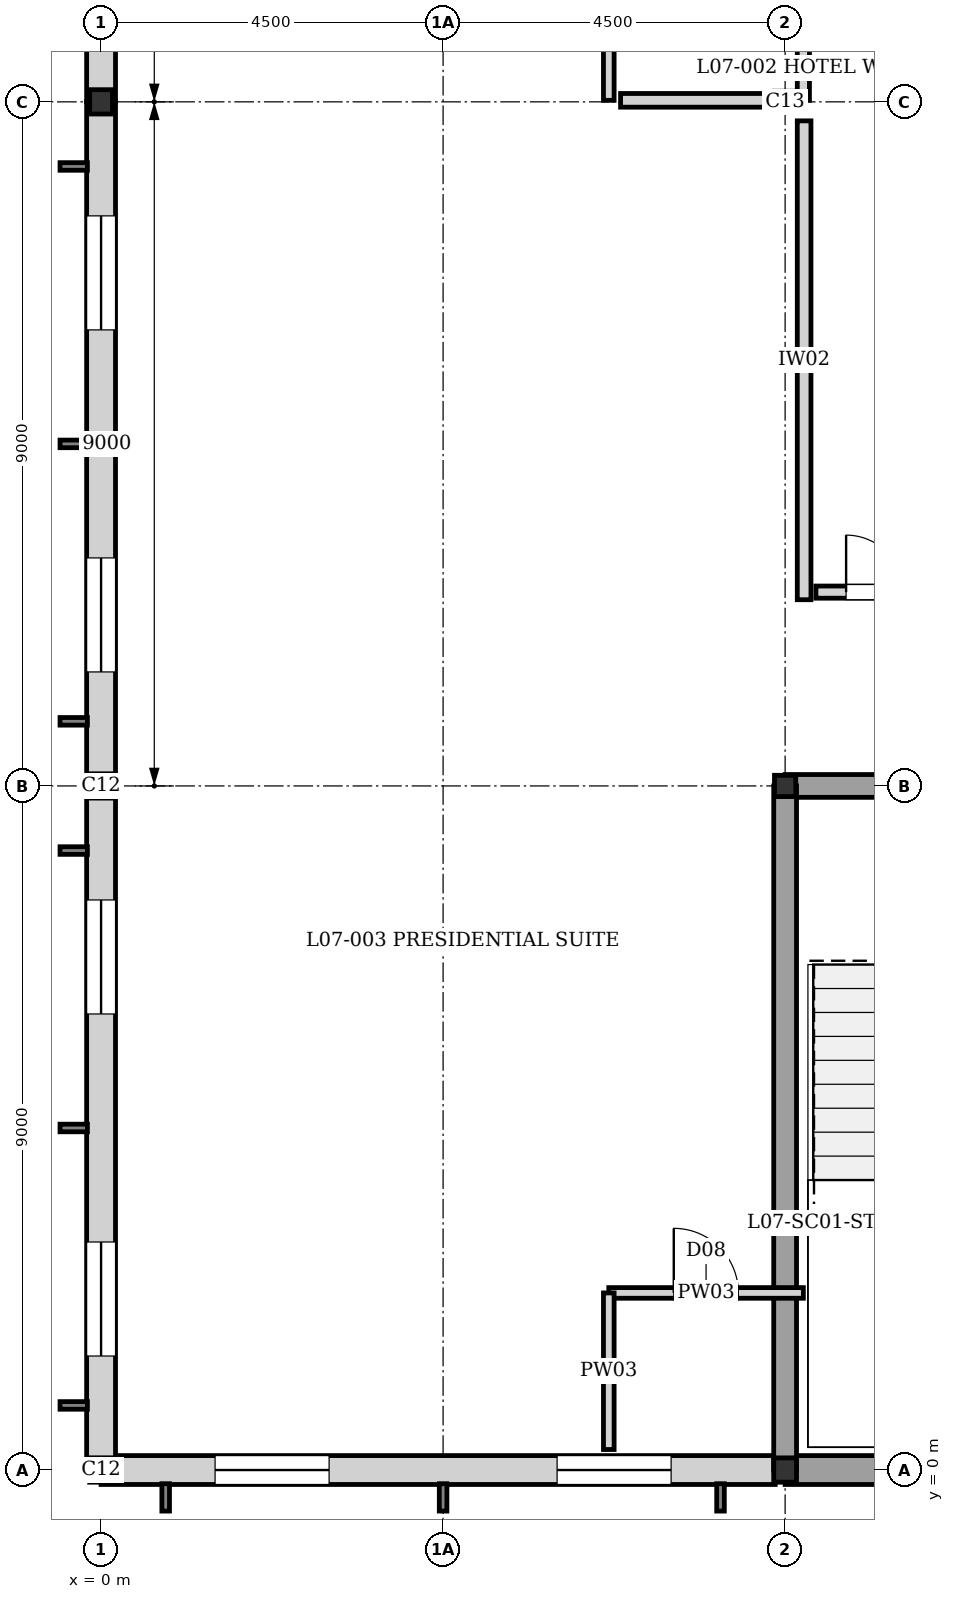
"""IFC4 building model, lengths in metres.
Left out: names, types, materials, properties, quantities, classifications, styles, units other than length and angle.
Written with IfcOpenShell. Run it as: python <this file> out.ifc"""

import sys

from ifc_helpers import new_model, si_unit, direction, frame, frame_2d, origin, origin_2d, place, context, subcontext, project, spatial, rectangle, i_section, extrude, element, fill, save


model = new_model("IFC4")
c1 = context("Model", 3, precision=1e-05, world=origin(), true_north=direction((0.0, 1.0)))
c2 = subcontext(c1, "Body", "Model", "MODEL_VIEW")
j1 = project(units=[si_unit("LENGTHUNIT", "METRE"), si_unit("PLANEANGLEUNIT", "RADIAN")], contexts=[c1])
p1 = place(None, origin())
s1 = spatial("IfcSite", under=j1, at=p1, CompositionType="ELEMENT")
p2 = place(p1, origin())
s2 = spatial("IfcBuilding", under=s1, at=p2, CompositionType="ELEMENT")
p3 = place(p2, frame((0.0, 0.0, 23.68)))
s3 = spatial("IfcBuildingStorey", under=s2, at=p3, CompositionType="ELEMENT", Elevation=23.68)
for number, where, z_axis, x_axis in (
    (1, (0.0, 0.0, 0.0), (0.0, 0.0, 1.0), (1.0, 0.0, 0.0)),
    (2, (0.0, 9.0, 0.0), (0.0, 0.0, 1.0), (1.0, 0.0, 0.0)),
    (3, (0.0, 18.0, 0.0), (0.0, 0.0, 1.0), (1.0, 0.0, 0.0)),
    (4, (9.0, 0.0, 0.0), (0.0, 0.0, 1.0), (1.0, 0.0, 0.0)),
):
    element("IfcColumn", number, at=place(p3, frame(where, z_axis=z_axis, x_axis=x_axis)), inside=s3, PredefinedType="COLUMN", context=c2, shape_type="SweptSolid", body=[
        extrude(i_section(OverallWidth=0.3, OverallDepth=0.32, WebThickness=0.011, FlangeThickness=0.021, at=origin_2d()), origin(), (0.0, 0.0, 1.0), 3.2),
    ])
for number, where, z_axis, x_axis in (
    (5, (9.0, 9.0, 0.0), (0.0, 0.0, 1.0), (1.0, 0.0, 0.0)),
    (6, (9.0, 18.0, 0.0), (0.0, 0.0, 1.0), (1.0, 0.0, 0.0)),
):
    element("IfcColumn", number, at=place(p3, frame(where, z_axis=z_axis, x_axis=x_axis)), inside=s3, PredefinedType="COLUMN", context=c2, shape_type="SweptSolid", body=[
        extrude(i_section(OverallWidth=0.28, OverallDepth=0.28, WebThickness=0.01, FlangeThickness=0.018, at=origin_2d()), origin(), (0.0, 0.0, 1.0), 3.2),
    ])
p4 = place(p3, frame((18.0, 0.0, 0.0), z_axis=(0.0, 0.0, 1.0), x_axis=(-1.0, 0.0, 0.0)))
e7 = element("IfcWall", 7, at=p4, inside=s3, PredefinedType="SOLIDWALL", context=c2, shape_type="SweptSolid", body=[
    extrude(rectangle(XDim=9.0, YDim=0.38, at=frame_2d((4.5, 0.0))), origin(), (0.0, 0.0, 1.0), 2.96),
])
p5 = place(p3, frame((8.87, 0.0, 0.0), z_axis=(0.0, 0.0, 1.0), x_axis=(-1.0, 0.0, 0.0)))
e8 = element("IfcWall", 8, at=p5, inside=s3, PredefinedType="SOLIDWALL", context=c2, shape_type="SweptSolid", body=[
    extrude(rectangle(XDim=8.87, YDim=0.38, at=frame_2d((4.435, 0.0))), origin(), (0.0, 0.0, 1.0), 2.66),
])
p6 = place(p5, frame((1.37, 0.0, 0.35)))
e9 = element("IfcOpeningElement", 9, at=p6, cuts=e8, PredefinedType="OPENING", context=c2, shape_type="SweptSolid", body=[
    extrude(rectangle(XDim=1.5, YDim=1.8, at=frame_2d((0.75, 0.9))), frame((0.0, 0.2, 0.0), z_axis=(0.0, -1.0, 0.0), x_axis=(1.0, 0.0, 0.0)), (0.0, 0.0, 1.0), 0.4),
])
p7 = place(p5, frame((5.87, 0.0, 0.35)))
e10 = element("IfcOpeningElement", 10, at=p7, cuts=e8, PredefinedType="OPENING", context=c2, shape_type="SweptSolid", body=[
    extrude(rectangle(XDim=1.5, YDim=1.8, at=frame_2d((0.75, 0.9))), frame((0.0, 0.2, 0.0), z_axis=(0.0, -1.0, 0.0), x_axis=(1.0, 0.0, 0.0)), (0.0, 0.0, 1.0), 0.4),
])
p8 = place(p3, frame((0.0, 0.155, 0.0), z_axis=(0.0, 0.0, 1.0), x_axis=(0.0, 1.0, 0.0)))
e11 = element("IfcWall", 11, at=p8, inside=s3, PredefinedType="SOLIDWALL", context=c2, shape_type="SweptSolid", body=[
    extrude(rectangle(XDim=8.845, YDim=0.38, at=frame_2d((4.422, 0.0))), origin(), (0.0, 0.0, 1.0), 2.6),
])
p9 = place(p8, frame((1.345, 0.0, 0.35)))
e12 = element("IfcOpeningElement", 12, at=p9, cuts=e11, PredefinedType="OPENING", context=c2, shape_type="SweptSolid", body=[
    extrude(rectangle(XDim=1.5, YDim=1.8, at=frame_2d((0.75, 0.9))), frame((0.0, 0.2, 0.0), z_axis=(0.0, -1.0, 0.0), x_axis=(1.0, 0.0, 0.0)), (0.0, 0.0, 1.0), 0.4),
])
p10 = place(p8, frame((5.845, 0.0, 0.35)))
e13 = element("IfcOpeningElement", 13, at=p10, cuts=e11, PredefinedType="OPENING", context=c2, shape_type="SweptSolid", body=[
    extrude(rectangle(XDim=1.5, YDim=1.8, at=frame_2d((0.75, 0.9))), frame((0.0, 0.2, 0.0), z_axis=(0.0, -1.0, 0.0), x_axis=(1.0, 0.0, 0.0)), (0.0, 0.0, 1.0), 0.4),
])
p11 = place(p3, frame((0.0, 9.0, 0.0), z_axis=(0.0, 0.0, 1.0), x_axis=(0.0, 1.0, 0.0)))
e14 = element("IfcWall", 14, at=p11, inside=s3, PredefinedType="SOLIDWALL", context=c2, shape_type="SweptSolid", body=[
    extrude(rectangle(XDim=9.0, YDim=0.38, at=frame_2d((4.5, 0.0))), origin(), (0.0, 0.0, 1.0), 2.56),
])
p12 = place(p11, frame((1.5, 0.0, 0.35)))
e15 = element("IfcOpeningElement", 15, at=p12, cuts=e14, PredefinedType="OPENING", context=c2, shape_type="SweptSolid", body=[
    extrude(rectangle(XDim=1.5, YDim=1.8, at=frame_2d((0.75, 0.9))), frame((0.0, 0.2, 0.0), z_axis=(0.0, -1.0, 0.0), x_axis=(1.0, 0.0, 0.0)), (0.0, 0.0, 1.0), 0.4),
])
p13 = place(p11, frame((6.0, 0.0, 0.35)))
e16 = element("IfcOpeningElement", 16, at=p13, cuts=e14, PredefinedType="OPENING", context=c2, shape_type="SweptSolid", body=[
    extrude(rectangle(XDim=1.5, YDim=1.8, at=frame_2d((0.75, 0.9))), frame((0.0, 0.2, 0.0), z_axis=(0.0, -1.0, 0.0), x_axis=(1.0, 0.0, 0.0)), (0.0, 0.0, 1.0), 0.4),
])
p14 = place(p3, frame((0.0, 18.0, 0.0), z_axis=(0.0, 0.0, 1.0), x_axis=(0.0, 1.0, 0.0)))
e17 = element("IfcWall", 17, at=p14, inside=s3, PredefinedType="SOLIDWALL", context=c2, shape_type="SweptSolid", body=[
    extrude(rectangle(XDim=9.0, YDim=0.38, at=frame_2d((4.5, 0.0))), origin(), (0.0, 0.0, 1.0), 2.96),
])
p15 = place(p14, frame((1.5, 0.0, 0.35)))
e18 = element("IfcOpeningElement", 18, at=p15, cuts=e17, PredefinedType="OPENING", context=c2, shape_type="SweptSolid", body=[
    extrude(rectangle(XDim=1.5, YDim=1.8, at=frame_2d((0.75, 0.9))), frame((0.0, 0.2, 0.0), z_axis=(0.0, -1.0, 0.0), x_axis=(1.0, 0.0, 0.0)), (0.0, 0.0, 1.0), 0.4),
])
p16 = place(p14, frame((6.0, 0.0, 0.35)))
e19 = element("IfcOpeningElement", 19, at=p16, cuts=e17, PredefinedType="OPENING", context=c2, shape_type="SweptSolid", body=[
    extrude(rectangle(XDim=1.5, YDim=1.8, at=frame_2d((0.75, 0.9))), frame((0.0, 0.2, 0.0), z_axis=(0.0, -1.0, 0.0), x_axis=(1.0, 0.0, 0.0)), (0.0, 0.0, 1.0), 0.4),
])
p17 = place(p3, frame((9.0, 9.0, 0.0), z_axis=(0.0, 0.0, 1.0), x_axis=(1.0, 0.0, 0.0)))
e20 = element("IfcWall", 20, at=p17, inside=s3, PredefinedType="SHEAR", context=c2, shape_type="SweptSolid", body=[
    extrude(rectangle(XDim=9.0, YDim=0.3, at=frame_2d((4.5, 0.0))), origin(), (0.0, 0.0, 1.0), 2.96),
])
p18 = place(p17, frame((5.95, 0.0, 0.0)))
e21 = element("IfcOpeningElement", 21, at=p18, cuts=e20, PredefinedType="OPENING", context=c2, shape_type="SweptSolid", body=[
    extrude(rectangle(XDim=1.6, YDim=2.1, at=frame_2d((0.8, 1.05))), frame((0.0, 0.16, 0.0), z_axis=(0.0, -1.0, 0.0), x_axis=(1.0, 0.0, 0.0)), (0.0, 0.0, 1.0), 0.32),
])
p19 = place(p3, frame((9.0, 0.0, 0.0), z_axis=(0.0, 0.0, 1.0), x_axis=(0.0, 1.0, 0.0)))
e22 = element("IfcWall", 22, at=p19, inside=s3, PredefinedType="SHEAR", context=c2, shape_type="SweptSolid", body=[
    extrude(rectangle(XDim=9.0, YDim=0.3, at=frame_2d((4.5, 0.0))), origin(), (0.0, 0.0, 1.0), 2.96),
])
p20 = place(p3, frame((6.68, 2.33, 0.0), z_axis=(0.0, 0.0, 1.0), x_axis=(1.0, 0.0, 0.0)))
e23 = element("IfcWall", 23, at=p20, inside=s3, PredefinedType="PLUMBINGWALL", context=c2, shape_type="SweptSolid", body=[
    extrude(rectangle(XDim=2.56, YDim=0.14, at=frame_2d((1.28, 0.0))), origin(), (0.0, 0.0, 1.0), 2.96),
])
p21 = place(p20, frame((0.855, 0.0, 0.0)))
e24 = element("IfcOpeningElement", 24, at=p21, cuts=e23, PredefinedType="OPENING", context=c2, shape_type="SweptSolid", body=[
    extrude(rectangle(XDim=0.85, YDim=2.04, at=frame_2d((0.425, 1.02))), frame((0.0, 0.08, 0.0), z_axis=(0.0, -1.0, 0.0), x_axis=(1.0, 0.0, 0.0)), (0.0, 0.0, 1.0), 0.16),
])
p22 = place(p3, frame((6.68, 0.27, 0.0), z_axis=(0.0, 0.0, 1.0), x_axis=(0.0, 1.0, 0.0)))
e25 = element("IfcWall", 25, at=p22, inside=s3, PredefinedType="PLUMBINGWALL", context=c2, shape_type="SweptSolid", body=[
    extrude(rectangle(XDim=2.06, YDim=0.14, at=frame_2d((1.03, 0.0))), origin(), (0.0, 0.0, 1.0), 2.96),
])
p23 = place(p3, frame((9.24, 18.02, 0.0), z_axis=(0.0, 0.0, 1.0), x_axis=(0.0, 1.0, 0.0)))
e26 = element("IfcWall", 26, at=p23, inside=s3, PredefinedType="PARTITIONING", context=c2, shape_type="SweptSolid", body=[
    extrude(rectangle(XDim=2.06, YDim=0.16, at=frame_2d((1.03, 0.0))), origin(), (0.0, 0.0, 1.0), 2.96),
])
p24 = place(p3, frame((6.68, 18.02, 0.0), z_axis=(0.0, 0.0, 1.0), x_axis=(0.0, 1.0, 0.0)))
e27 = element("IfcWall", 27, at=p24, inside=s3, PredefinedType="PLUMBINGWALL", context=c2, shape_type="SweptSolid", body=[
    extrude(rectangle(XDim=2.06, YDim=0.14, at=frame_2d((1.03, 0.0))), origin(), (0.0, 0.0, 1.0), 2.96),
])
p25 = place(p3, frame((9.25, 11.45, 0.0), z_axis=(0.0, 0.0, 1.0), x_axis=(0.0, 1.0, 0.0)))
e28 = element("IfcWall", 28, at=p25, inside=s3, PredefinedType="PARTITIONING", context=c2, shape_type="SweptSolid", body=[
    extrude(rectangle(XDim=6.3, YDim=0.18, at=frame_2d((3.15, 0.0))), origin(), (0.0, 0.0, 1.0), 2.96),
])
p26 = place(p3, frame((6.835, 18.02, 0.0), z_axis=(0.0, 0.0, 1.0), x_axis=(1.0, 0.0, 0.0)))
e29 = element("IfcWall", 29, at=p26, inside=s3, PredefinedType="PARTITIONING", context=c2, shape_type="SweptSolid", body=[
    extrude(rectangle(XDim=2.26, YDim=0.18, at=frame_2d((1.13, 0.0))), origin(), (0.0, 0.0, 1.0), 2.66),
])
p27 = place(p3, frame((9.405, 11.55, 0.0), z_axis=(0.0, 0.0, 1.0), x_axis=(1.0, 0.0, 0.0)))
e30 = element("IfcWall", 30, at=p27, inside=s3, PredefinedType="PARTITIONING", context=c2, shape_type="SweptSolid", body=[
    extrude(rectangle(XDim=2.295, YDim=0.16, at=frame_2d((1.147, 0.0))), origin(), (0.0, 0.0, 1.0), 2.96),
])
p28 = place(p27, frame((0.397, 0.0, 0.0)))
e31 = element("IfcOpeningElement", 31, at=p28, cuts=e30, PredefinedType="OPENING", context=c2, shape_type="SweptSolid", body=[
    extrude(rectangle(XDim=1.5, YDim=2.1, at=frame_2d((0.75, 1.05))), frame((0.0, 0.09, 0.0), z_axis=(0.0, -1.0, 0.0), x_axis=(1.0, 0.0, 0.0)), (0.0, 0.0, 1.0), 0.18),
])
p29 = place(p6, origin())
e32 = element("IfcWindow", 32, at=p29, inside=s3, PartitioningType="SINGLE_PANEL", PredefinedType="WINDOW", context=c2, shape_type="SweptSolid", body=[
    extrude(rectangle(XDim=1.5, YDim=1.8, at=frame_2d((0.75, 0.9))), frame((0.0, 0.03, 0.0), z_axis=(0.0, -1.0, 0.0), x_axis=(1.0, 0.0, 0.0)), (0.0, 0.0, 1.0), 0.06),
])
fill(e9, e32)
p30 = place(p7, origin())
e33 = element("IfcWindow", 33, at=p30, inside=s3, PartitioningType="SINGLE_PANEL", PredefinedType="WINDOW", context=c2, shape_type="SweptSolid", body=[
    extrude(rectangle(XDim=1.5, YDim=1.8, at=frame_2d((0.75, 0.9))), frame((0.0, 0.03, 0.0), z_axis=(0.0, -1.0, 0.0), x_axis=(1.0, 0.0, 0.0)), (0.0, 0.0, 1.0), 0.06),
])
fill(e10, e33)
p31 = place(p9, origin())
e34 = element("IfcWindow", 34, at=p31, inside=s3, PartitioningType="SINGLE_PANEL", PredefinedType="WINDOW", context=c2, shape_type="SweptSolid", body=[
    extrude(rectangle(XDim=1.5, YDim=1.8, at=frame_2d((0.75, 0.9))), frame((0.0, 0.03, 0.0), z_axis=(0.0, -1.0, 0.0), x_axis=(1.0, 0.0, 0.0)), (0.0, 0.0, 1.0), 0.06),
])
fill(e12, e34)
p32 = place(p10, origin())
e35 = element("IfcWindow", 35, at=p32, inside=s3, PartitioningType="SINGLE_PANEL", PredefinedType="WINDOW", context=c2, shape_type="SweptSolid", body=[
    extrude(rectangle(XDim=1.5, YDim=1.8, at=frame_2d((0.75, 0.9))), frame((0.0, 0.03, 0.0), z_axis=(0.0, -1.0, 0.0), x_axis=(1.0, 0.0, 0.0)), (0.0, 0.0, 1.0), 0.06),
])
fill(e13, e35)
p33 = place(p12, origin())
e36 = element("IfcWindow", 36, at=p33, inside=s3, PartitioningType="SINGLE_PANEL", PredefinedType="WINDOW", context=c2, shape_type="SweptSolid", body=[
    extrude(rectangle(XDim=1.5, YDim=1.8, at=frame_2d((0.75, 0.9))), frame((0.0, 0.03, 0.0), z_axis=(0.0, -1.0, 0.0), x_axis=(1.0, 0.0, 0.0)), (0.0, 0.0, 1.0), 0.06),
])
fill(e15, e36)
p34 = place(p13, origin())
e37 = element("IfcWindow", 37, at=p34, inside=s3, PartitioningType="SINGLE_PANEL", PredefinedType="WINDOW", context=c2, shape_type="SweptSolid", body=[
    extrude(rectangle(XDim=1.5, YDim=1.8, at=frame_2d((0.75, 0.9))), frame((0.0, 0.03, 0.0), z_axis=(0.0, -1.0, 0.0), x_axis=(1.0, 0.0, 0.0)), (0.0, 0.0, 1.0), 0.06),
])
fill(e16, e37)
p35 = place(p21, origin())
e38 = element("IfcDoor", 38, at=p35, inside=s3, OperationType="SINGLE_SWING_LEFT", PredefinedType="DOOR", context=c2, shape_type="SweptSolid", body=[
    extrude(rectangle(XDim=0.85, YDim=2.04, at=frame_2d((0.425, 1.02))), frame((0.0, 0.025, 0.0), z_axis=(0.0, -1.0, 0.0), x_axis=(1.0, 0.0, 0.0)), (0.0, 0.0, 1.0), 0.05),
])
fill(e24, e38)
p36 = place(p28, origin())
e39 = element("IfcDoor", 39, at=p36, inside=s3, OperationType="DOUBLE_DOOR_SINGLE_SWING", PredefinedType="DOOR", context=c2, shape_type="SweptSolid", body=[
    extrude(rectangle(XDim=1.5, YDim=2.1, at=frame_2d((0.75, 1.05))), frame((0.0, 0.025, 0.0), z_axis=(0.0, -1.0, 0.0), x_axis=(1.0, 0.0, 0.0)), (0.0, 0.0, 1.0), 0.05),
])
fill(e31, e39)
save(model, sys.argv[1])
